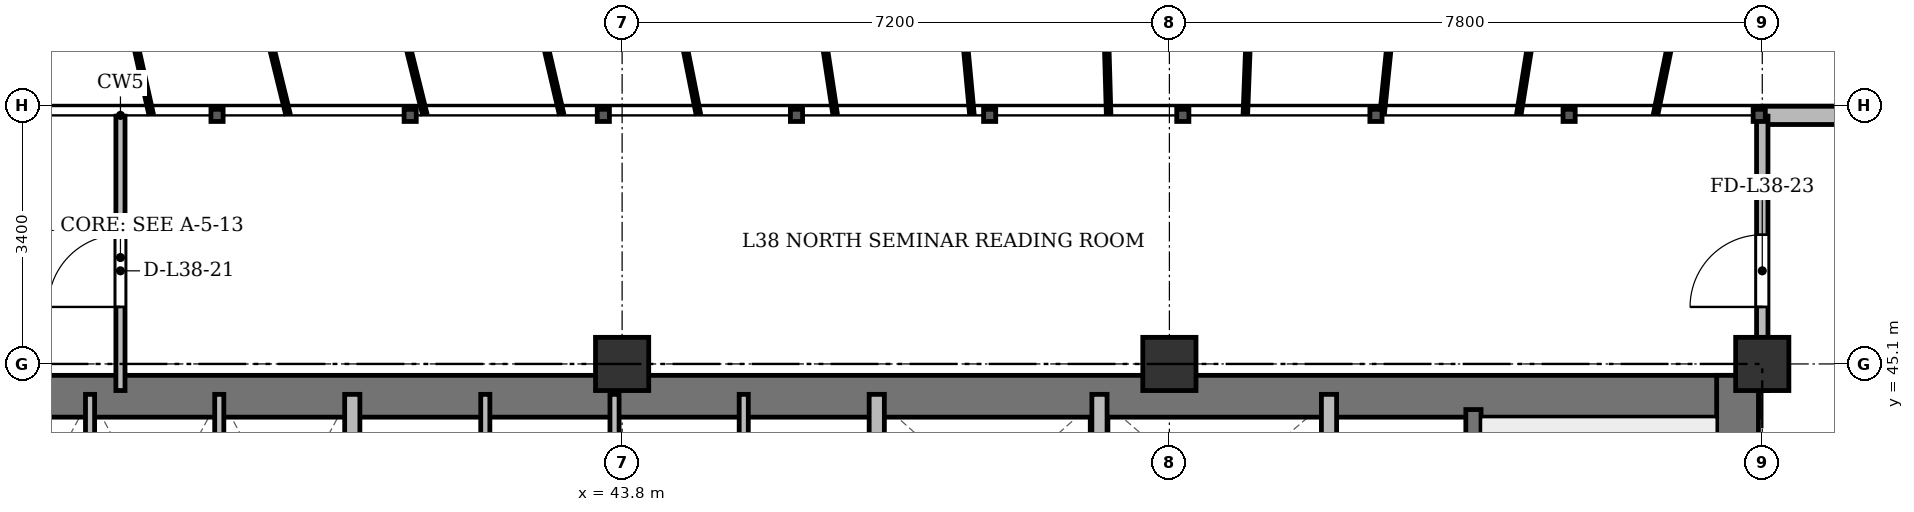
"""IFC4 building model, lengths in metres.
Left out: names, types, materials, properties, quantities, classifications, styles, units other than length and angle.
Written with IfcOpenShell. Run it as: python <this file> out.ifc"""

import sys

from ifc_helpers import new_model, si_unit, direction, frame, frame_2d, origin, origin_2d, place, context, subcontext, project, spatial, rectangle, extrude, source, transform, mapped, element, fill, save


model = new_model("IFC4")
c1 = context("Model", 3, precision=1e-05, world=origin(), true_north=direction((0.0, 1.0)))
c2 = subcontext(c1, "Body", "Model", "MODEL_VIEW")
j1 = project(units=[si_unit("LENGTHUNIT", "METRE"), si_unit("PLANEANGLEUNIT", "RADIAN")], contexts=[c1])
p1 = place(None, origin())
s1 = spatial("IfcSite", under=j1, at=p1, CompositionType="ELEMENT")
p2 = place(p1, origin())
s2 = spatial("IfcBuilding", under=s1, at=p2, CompositionType="ELEMENT")
p3 = place(p2, frame((0.0, 0.0, 146.5)))
s3 = spatial("IfcBuildingStorey", under=s2, at=p3, CompositionType="ELEMENT", Elevation=146.5)
m1 = source(origin(), c2, "Body", "SweptSolid", [
    extrude(rectangle(XDim=0.7, YDim=0.7, at=origin_2d()), origin(), (0.0, 0.0, 1.0), 3.6),
])
for number, where, z_axis, x_axis in (
    (1, (43.8, 45.1, 0.0), (0.0, 0.0, 1.0), (1.0, 0.0, 0.0)),
    (2, (51.0, 45.1, 0.0), (0.0, 0.0, 1.0), (1.0, 0.0, 0.0)),
    (3, (58.8, 45.1, 0.0), (0.0, 0.0, 1.0), (1.0, 0.0, 0.0)),
):
    element("IfcColumn", number, at=place(p3, frame(where, z_axis=z_axis, x_axis=x_axis)), inside=s3, PredefinedType="COLUMN", context=c2, shape_type="MappedRepresentation", body=[
        mapped(m1, transform((0.0, 0.0, 0.0), x_axis=(1.0, 0.0, 0.0), y_axis=(0.0, 1.0, 0.0), z_axis=(0.0, 0.0, 1.0), scale=1.0)),
    ])
p4 = place(p3, frame((58.8, 48.37, 0.0), z_axis=(0.0, 0.0, 1.0), x_axis=(1.0, 0.0, 0.0)))
e4 = element("IfcWall", 4, at=p4, inside=s3, PredefinedType="SOLIDWALL", context=c2, shape_type="SweptSolid", body=[
    extrude(rectangle(XDim=4.7, YDim=0.24, at=frame_2d((2.35, 0.0))), origin(), (0.0, 0.0, 1.0), 3.35),
])
p5 = place(p4, frame((1.659, 0.0, 0.9)))
e5 = element("IfcOpeningElement", 5, at=p5, cuts=e4, PredefinedType="OPENING", context=c2, shape_type="SweptSolid", body=[
    extrude(rectangle(XDim=1.2, YDim=1.65, at=frame_2d((0.6, 0.825))), frame((0.0, 0.13, 0.0), z_axis=(0.0, -1.0, 0.0), x_axis=(1.0, 0.0, 0.0)), (0.0, 0.0, 1.0), 0.26),
])
p6 = place(p3, frame((15.65, 44.675, 0.0), z_axis=(0.0, 0.0, 1.0), x_axis=(1.0, 0.0, 0.0)))
e6 = element("IfcWall", 6, at=p6, inside=s3, PredefinedType="SHEAR", context=c2, shape_type="SweptSolid", body=[
    extrude(rectangle(XDim=43.1, YDim=0.55, at=frame_2d((21.55, 0.0))), origin(), (0.0, 0.0, 1.0), 3.35),
])
p7 = place(p3, frame((58.475, 33.4, 0.0), z_axis=(0.0, 0.0, 1.0), x_axis=(0.0, 1.0, 0.0)))
e7 = element("IfcWall", 7, at=p7, inside=s3, PredefinedType="SHEAR", context=c2, shape_type="SweptSolid", body=[
    extrude(rectangle(XDim=11.55, YDim=0.55, at=frame_2d((5.775, 0.0))), origin(), (0.0, 0.0, 1.0), 3.35),
])
p8 = place(p3, frame((55.0, 33.4, 0.0), z_axis=(0.0, 0.0, 1.0), x_axis=(0.0, 1.0, 0.0)))
e8 = element("IfcWall", 8, at=p8, inside=s3, PredefinedType="SHEAR", context=c2, shape_type="SweptSolid", body=[
    extrude(rectangle(XDim=11.1, YDim=0.2, at=frame_2d((5.55, 0.0))), origin(), (0.0, 0.0, 1.0), 3.35),
])
p9 = place(p8, frame((0.85, 0.0, 0.0)))
e9 = element("IfcOpeningElement", 9, at=p9, cuts=e8, PredefinedType="OPENING", context=c2, shape_type="SweptSolid", body=[
    extrude(rectangle(XDim=1.1, YDim=2.15, at=frame_2d((0.55, 1.075))), frame((0.0, 0.11, 0.0), z_axis=(0.0, -1.0, 0.0), x_axis=(1.0, 0.0, 0.0)), (0.0, 0.0, 1.0), 0.22),
])
for number, where, z_axis, x_axis in (
    (10, (36.8, 41.5, 0.0), (0.0, 0.0, 1.0), (0.0, 1.0, 0.0)),
    (11, (38.5, 41.5, 0.0), (0.0, 0.0, 1.0), (0.0, 1.0, 0.0)),
):
    element("IfcWall", number, at=place(p3, frame(where, z_axis=z_axis, x_axis=x_axis)), inside=s3, PredefinedType="PARTITIONING", context=c2, shape_type="SweptSolid", body=[
        extrude(rectangle(XDim=3.2, YDim=0.12, at=frame_2d((1.6, 0.0))), origin(), (0.0, 0.0, 1.0), 3.35),
    ])
p10 = place(p3, frame((40.25, 41.5, 0.0), z_axis=(0.0, 0.0, 1.0), x_axis=(0.0, 1.0, 0.0)))
e12 = element("IfcWall", 12, at=p10, inside=s3, PredefinedType="SOLIDWALL", context=c2, shape_type="SweptSolid", body=[
    extrude(rectangle(XDim=3.2, YDim=0.2, at=frame_2d((1.6, 0.0))), origin(), (0.0, 0.0, 1.0), 3.35),
])
p11 = place(p3, frame((42.0, 41.5, 0.0), z_axis=(0.0, 0.0, 1.0), x_axis=(0.0, 1.0, 0.0)))
e13 = element("IfcWall", 13, at=p11, inside=s3, PredefinedType="PARTITIONING", context=c2, shape_type="SweptSolid", body=[
    extrude(rectangle(XDim=3.2, YDim=0.12, at=frame_2d((1.6, 0.0))), origin(), (0.0, 0.0, 1.0), 3.35),
])
p12 = place(p3, frame((43.7, 41.5, 0.0), z_axis=(0.0, 0.0, 1.0), x_axis=(0.0, 1.0, 0.0)))
e14 = element("IfcWall", 14, at=p12, inside=s3, PredefinedType="PARTITIONING", context=c2, shape_type="SweptSolid", body=[
    extrude(rectangle(XDim=3.2, YDim=0.12, at=frame_2d((1.6, 0.0))), origin(), (0.0, 0.0, 1.0), 2.85),
])
p13 = place(p3, frame((45.4, 41.5, 0.0), z_axis=(0.0, 0.0, 1.0), x_axis=(0.0, 1.0, 0.0)))
e15 = element("IfcWall", 15, at=p13, inside=s3, PredefinedType="PARTITIONING", context=c2, shape_type="SweptSolid", body=[
    extrude(rectangle(XDim=3.2, YDim=0.12, at=frame_2d((1.6, 0.0))), origin(), (0.0, 0.0, 1.0), 3.35),
])
p14 = place(p3, frame((47.15, 33.4, 0.0), z_axis=(0.0, 0.0, 1.0), x_axis=(0.0, 1.0, 0.0)))
e16 = element("IfcWall", 16, at=p14, inside=s3, PredefinedType="SOLIDWALL", context=c2, shape_type="SweptSolid", body=[
    extrude(rectangle(XDim=11.3, YDim=0.2, at=frame_2d((5.65, 0.0))), origin(), (0.0, 0.0, 1.0), 2.75),
])
for number, where, z_axis, x_axis in (
    (17, (50.08, 42.05, 0.0), (0.0, 0.0, 1.0), (0.0, 1.0, 0.0)),
    (18, (53.1, 42.05, 0.0), (0.0, 0.0, 1.0), (0.0, 1.0, 0.0)),
):
    element("IfcWall", number, at=place(p3, frame(where, z_axis=z_axis, x_axis=x_axis)), inside=s3, PredefinedType="SOLIDWALL", context=c2, shape_type="SweptSolid", body=[
        extrude(rectangle(XDim=2.65, YDim=0.2, at=frame_2d((1.325, 0.0))), origin(), (0.0, 0.0, 1.0), 3.35),
    ])
p15 = place(p3, frame((37.2, 44.75, 0.0), z_axis=(0.0, 0.0, 1.0), x_axis=(0.0, 1.0, 0.0)))
e19 = element("IfcWall", 19, at=p15, inside=s3, PredefinedType="PARTITIONING", context=c2, shape_type="SweptSolid", body=[
    extrude(rectangle(XDim=3.61, YDim=0.12, at=frame_2d((1.805, 0.0))), origin(), (0.0, 0.0, 1.0), 2.75),
])
p16 = place(p15, frame((1.1, 0.0, 0.0)))
e20 = element("IfcOpeningElement", 20, at=p16, cuts=e19, PredefinedType="OPENING", context=c2, shape_type="SweptSolid", body=[
    extrude(rectangle(XDim=0.95, YDim=2.15, at=frame_2d((0.475, 1.075))), frame((0.0, 0.07, 0.0), z_axis=(0.0, -1.0, 0.0), x_axis=(1.0, 0.0, 0.0)), (0.0, 0.0, 1.0), 0.14),
])
p17 = place(p3, frame((58.8, 44.75, 0.0), z_axis=(0.0, 0.0, 1.0), x_axis=(0.0, 1.0, 0.0)))
e21 = element("IfcWall", 21, at=p17, inside=s3, PredefinedType="PARTITIONING", context=c2, shape_type="SweptSolid", body=[
    extrude(rectangle(XDim=3.61, YDim=0.15, at=frame_2d((1.805, 0.0))), origin(), (0.0, 0.0, 1.0), 2.85),
])
p18 = place(p17, frame((1.1, 0.0, 0.0)))
e22 = element("IfcOpeningElement", 22, at=p18, cuts=e21, PredefinedType="OPENING", context=c2, shape_type="SweptSolid", body=[
    extrude(rectangle(XDim=0.95, YDim=2.15, at=frame_2d((0.475, 1.075))), frame((0.0, 0.085, 0.0), z_axis=(0.0, -1.0, 0.0), x_axis=(1.0, 0.0, 0.0)), (0.0, 0.0, 1.0), 0.17),
])
m2 = source(origin(), c2, "Body", "SweptSolid", [
    extrude(rectangle(XDim=0.95, YDim=2.15, at=frame_2d((0.475, 1.075))), frame((0.0, 0.025, 0.0), z_axis=(0.0, -1.0, 0.0), x_axis=(1.0, 0.0, 0.0)), (0.0, 0.0, 1.0), 0.05),
])
p19 = place(p16, origin())
e23 = element("IfcDoor", 23, at=p19, inside=s3, OperationType="SINGLE_SWING_LEFT", PredefinedType="DOOR", context=c2, shape_type="MappedRepresentation", body=[
    mapped(m2, transform((0.0, 0.0, 0.0), x_axis=(1.0, 0.0, 0.0), y_axis=(0.0, 1.0, 0.0), z_axis=(0.0, 0.0, 1.0), scale=1.0)),
])
fill(e20, e23)
p20 = place(p18, origin())
e24 = element("IfcDoor", 24, at=p20, inside=s3, OperationType="SINGLE_SWING_LEFT", PredefinedType="DOOR", context=c2, shape_type="MappedRepresentation", body=[
    mapped(m2, transform((0.0, 0.0, 0.0), x_axis=(1.0, 0.0, 0.0), y_axis=(0.0, 1.0, 0.0), z_axis=(0.0, 0.0, 1.0), scale=1.0)),
])
fill(e22, e24)
save(model, sys.argv[1])
